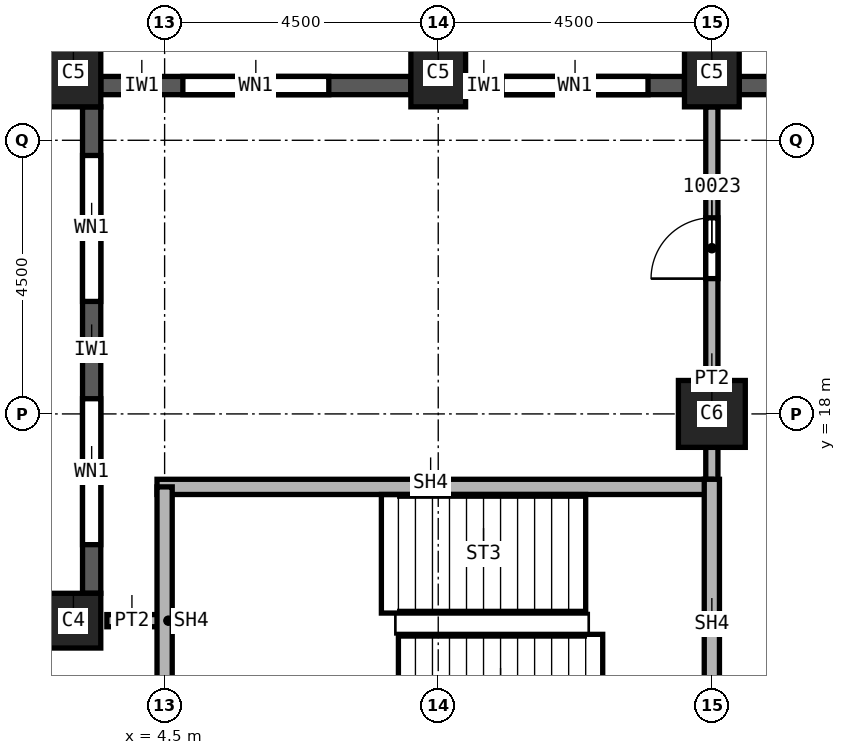
"""IFC4 building model, lengths in metres.
Left out: names, types, materials, properties, quantities, classifications, styles, units other than length and angle.
Written with IfcOpenShell. Run it as: python <this file> out.ifc"""

import sys

from ifc_helpers import new_model, si_unit, direction, frame, frame_2d, origin, origin_2d, place, context, subcontext, project, spatial, rectangle, extrude, element, fill, save


model = new_model("IFC4")
c1 = context("Model", 3, precision=1e-05, world=origin(), true_north=direction((0.0, 1.0)))
c2 = subcontext(c1, "Body", "Model", "MODEL_VIEW")
j1 = project(units=[si_unit("LENGTHUNIT", "METRE"), si_unit("PLANEANGLEUNIT", "RADIAN")], contexts=[c1])
p1 = place(None, origin())
s1 = spatial("IfcSite", under=j1, at=p1, CompositionType="ELEMENT")
p2 = place(p1, origin())
s2 = spatial("IfcBuilding", under=s1, at=p2, CompositionType="ELEMENT")
p3 = place(p2, frame((0.0, 0.0, 170.0)))
s3 = spatial("IfcBuildingStorey", under=s2, at=p3, CompositionType="ELEMENT", Elevation=170.0)
p4 = place(p3, frame((13.5, 18.0, 0.0), z_axis=(0.0, 0.0, 1.0), x_axis=(1.0, 0.0, 0.0)))
e1 = element("IfcColumn", 1, at=p4, inside=s3, PredefinedType="COLUMN", context=c2, shape_type="SweptSolid", body=[
    extrude(rectangle(XDim=1.1, YDim=1.1, at=origin_2d()), origin(), (0.0, 0.0, 1.0), 3.7),
])
for number, where, z_axis, x_axis in (
    (2, (3.0, 23.6, 0.0), (0.0, 0.0, 1.0), (1.0, 0.0, 0.0)),
    (3, (9.0, 23.6, 0.0), (0.0, 0.0, 1.0), (1.0, 0.0, 0.0)),
    (4, (13.5, 23.6, 0.0), (0.0, 0.0, 1.0), (1.0, 0.0, 0.0)),
):
    element("IfcColumn", number, at=place(p3, frame(where, z_axis=z_axis, x_axis=x_axis)), inside=s3, PredefinedType="COLUMN", context=c2, shape_type="SweptSolid", body=[
        extrude(rectangle(XDim=0.9, YDim=1.1, at=origin_2d()), origin(), (0.0, 0.0, 1.0), 3.7),
    ])
p5 = place(p3, frame((3.0, 14.6, 0.0), z_axis=(0.0, 0.0, 1.0), x_axis=(1.0, 0.0, 0.0)))
e5 = element("IfcColumn", 5, at=p5, inside=s3, PredefinedType="COLUMN", context=c2, shape_type="SweptSolid", body=[
    extrude(rectangle(XDim=0.9, YDim=0.9, at=origin_2d()), origin(), (0.0, 0.0, 1.0), 3.7),
])
p6 = place(p3, frame((17.55, 23.4, 0.0), z_axis=(0.0, 0.0, 1.0), x_axis=(-1.0, 0.0, 0.0)))
e6 = element("IfcWall", 6, at=p6, inside=s3, PredefinedType="SOLIDWALL", context=c2, shape_type="SweptSolid", body=[
    extrude(rectangle(XDim=3.6, YDim=0.3, at=frame_2d((1.8, 0.0))), origin(), (0.0, 0.0, 1.0), 3.1),
])
p7 = place(p6, frame((0.775, 0.0, 0.8)))
e7 = element("IfcOpeningElement", 7, at=p7, cuts=e6, PredefinedType="OPENING", context=c2, shape_type="SweptSolid", body=[
    extrude(rectangle(XDim=1.0, YDim=1.95, at=frame_2d((0.5, 0.975))), frame((0.0, 0.15, 0.0), z_axis=(0.0, -1.0, 0.0), x_axis=(1.0, 0.0, 0.0)), (0.0, 0.0, 1.0), 0.3),
])
p8 = place(p6, frame((2.375, 0.0, 0.8)))
e8 = element("IfcOpeningElement", 8, at=p8, cuts=e6, PredefinedType="OPENING", context=c2, shape_type="SweptSolid", body=[
    extrude(rectangle(XDim=0.6, YDim=1.95, at=frame_2d((0.3, 0.975))), frame((0.0, 0.15, 0.0), z_axis=(0.0, -1.0, 0.0), x_axis=(1.0, 0.0, 0.0)), (0.0, 0.0, 1.0), 0.3),
])
p9 = place(p3, frame((13.05, 23.4, 0.0), z_axis=(0.0, 0.0, 1.0), x_axis=(-1.0, 0.0, 0.0)))
e9 = element("IfcWall", 9, at=p9, inside=s3, PredefinedType="SOLIDWALL", context=c2, shape_type="SweptSolid", body=[
    extrude(rectangle(XDim=3.6, YDim=0.3, at=frame_2d((1.8, 0.0))), origin(), (0.0, 0.0, 1.0), 3.1),
])
p10 = place(p9, frame((0.6, 0.0, 0.8)))
e10 = element("IfcOpeningElement", 10, at=p10, cuts=e9, PredefinedType="OPENING", context=c2, shape_type="SweptSolid", body=[
    extrude(rectangle(XDim=2.4, YDim=1.95, at=frame_2d((1.2, 0.975))), frame((0.0, 0.15, 0.0), z_axis=(0.0, -1.0, 0.0), x_axis=(1.0, 0.0, 0.0)), (0.0, 0.0, 1.0), 0.3),
])
p11 = place(p3, frame((8.55, 23.4, 0.0), z_axis=(0.0, 0.0, 1.0), x_axis=(-1.0, 0.0, 0.0)))
e11 = element("IfcWall", 11, at=p11, inside=s3, PredefinedType="SOLIDWALL", context=c2, shape_type="SweptSolid", body=[
    extrude(rectangle(XDim=5.1, YDim=0.3, at=frame_2d((2.55, 0.0))), origin(), (0.0, 0.0, 1.0), 3.1),
])
p12 = place(p11, frame((1.35, 0.0, 0.8)))
e12 = element("IfcOpeningElement", 12, at=p12, cuts=e11, PredefinedType="OPENING", context=c2, shape_type="SweptSolid", body=[
    extrude(rectangle(XDim=2.4, YDim=1.95, at=frame_2d((1.2, 0.975))), frame((0.0, 0.15, 0.0), z_axis=(0.0, -1.0, 0.0), x_axis=(1.0, 0.0, 0.0)), (0.0, 0.0, 1.0), 0.3),
])
p13 = place(p3, frame((3.3, 23.05, 0.0), z_axis=(0.0, 0.0, 1.0), x_axis=(0.0, -1.0, 0.0)))
e13 = element("IfcWall", 13, at=p13, inside=s3, PredefinedType="SOLIDWALL", context=c2, shape_type="SweptSolid", body=[
    extrude(rectangle(XDim=8.0, YDim=0.3, at=frame_2d((4.0, 0.0))), origin(), (0.0, 0.0, 1.0), 3.1),
])
p14 = place(p13, frame((0.8, 0.0, 0.8)))
e14 = element("IfcOpeningElement", 14, at=p14, cuts=e13, PredefinedType="OPENING", context=c2, shape_type="SweptSolid", body=[
    extrude(rectangle(XDim=2.4, YDim=1.95, at=frame_2d((1.2, 0.975))), frame((0.0, 0.15, 0.0), z_axis=(0.0, -1.0, 0.0), x_axis=(1.0, 0.0, 0.0)), (0.0, 0.0, 1.0), 0.3),
])
p15 = place(p13, frame((4.8, 0.0, 0.8)))
e15 = element("IfcOpeningElement", 15, at=p15, cuts=e13, PredefinedType="OPENING", context=c2, shape_type="SweptSolid", body=[
    extrude(rectangle(XDim=2.4, YDim=1.95, at=frame_2d((1.2, 0.975))), frame((0.0, 0.15, 0.0), z_axis=(0.0, -1.0, 0.0), x_axis=(1.0, 0.0, 0.0)), (0.0, 0.0, 1.0), 0.3),
])
p16 = place(p3, frame((3.55, 14.6, 0.0), z_axis=(0.0, 0.0, 1.0), x_axis=(1.0, 0.0, 0.0)))
e16 = element("IfcWall", 16, at=p16, inside=s3, PredefinedType="PARTITIONING", context=c2, shape_type="SweptSolid", body=[
    extrude(rectangle(XDim=0.95, YDim=0.2, at=frame_2d((0.475, 0.0))), origin(), (0.0, 0.0, 1.0), 3.7),
])
p17 = place(p3, frame((13.5, 16.675, 0.0), z_axis=(0.0, 0.0, 1.0), x_axis=(0.0, 1.0, 0.0)))
e17 = element("IfcWall", 17, at=p17, inside=s3, PredefinedType="PARTITIONING", context=c2, shape_type="SweptSolid", body=[
    extrude(rectangle(XDim=6.375, YDim=0.2, at=frame_2d((3.188, 0.0))), origin(), (0.0, 0.0, 1.0), 3.7),
])
p18 = place(p17, frame((3.55, 0.0, 0.0)))
e18 = element("IfcOpeningElement", 18, at=p18, cuts=e17, PredefinedType="OPENING", context=c2, shape_type="SweptSolid", body=[
    extrude(rectangle(XDim=1.0, YDim=2.1, at=frame_2d((0.5, 1.05))), frame((0.0, 0.1, 0.0), z_axis=(0.0, -1.0, 0.0), x_axis=(1.0, 0.0, 0.0)), (0.0, 0.0, 1.0), 0.2),
])
p19 = place(p3, frame((4.375, 16.8, 0.0), z_axis=(0.0, 0.0, 1.0), x_axis=(1.0, 0.0, 0.0)))
e19 = element("IfcWall", 19, at=p19, inside=s3, PredefinedType="SOLIDWALL", context=c2, shape_type="SweptSolid", body=[
    extrude(rectangle(XDim=9.125, YDim=0.25, at=frame_2d((4.562, 0.0))), origin(), (0.0, 0.0, 1.0), 3.7),
])
p20 = place(p3, frame((4.5, 12.3, 0.0), z_axis=(0.0, 0.0, 1.0), x_axis=(0.0, 1.0, 0.0)))
e20 = element("IfcWall", 20, at=p20, inside=s3, PredefinedType="SOLIDWALL", context=c2, shape_type="SweptSolid", body=[
    extrude(rectangle(XDim=4.5, YDim=0.25, at=frame_2d((2.25, 0.0))), origin(), (0.0, 0.0, 1.0), 3.7),
])
p21 = place(p3, frame((13.5, 12.175, 0.0), z_axis=(0.0, 0.0, 1.0), x_axis=(0.0, 1.0, 0.0)))
e21 = element("IfcWall", 21, at=p21, inside=s3, PredefinedType="SOLIDWALL", context=c2, shape_type="SweptSolid", body=[
    extrude(rectangle(XDim=4.75, YDim=0.25, at=frame_2d((2.375, 0.0))), origin(), (0.0, 0.0, 1.0), 3.7),
])
p22 = place(p10, origin())
e22 = element("IfcWindow", 22, at=p22, inside=s3, PartitioningType="SINGLE_PANEL", PredefinedType="WINDOW", context=c2, shape_type="SweptSolid", body=[
    extrude(rectangle(XDim=2.4, YDim=1.95, at=frame_2d((1.2, 0.975))), frame((0.0, 0.03, 0.0), z_axis=(0.0, -1.0, 0.0), x_axis=(1.0, 0.0, 0.0)), (0.0, 0.0, 1.0), 0.06),
])
fill(e10, e22)
p23 = place(p12, origin())
e23 = element("IfcWindow", 23, at=p23, inside=s3, PartitioningType="SINGLE_PANEL", PredefinedType="WINDOW", context=c2, shape_type="SweptSolid", body=[
    extrude(rectangle(XDim=2.4, YDim=1.95, at=frame_2d((1.2, 0.975))), frame((0.0, 0.03, 0.0), z_axis=(0.0, -1.0, 0.0), x_axis=(1.0, 0.0, 0.0)), (0.0, 0.0, 1.0), 0.06),
])
fill(e12, e23)
p24 = place(p14, origin())
e24 = element("IfcWindow", 24, at=p24, inside=s3, PartitioningType="SINGLE_PANEL", PredefinedType="WINDOW", context=c2, shape_type="SweptSolid", body=[
    extrude(rectangle(XDim=2.4, YDim=1.95, at=frame_2d((1.2, 0.975))), frame((0.0, 0.03, 0.0), z_axis=(0.0, -1.0, 0.0), x_axis=(1.0, 0.0, 0.0)), (0.0, 0.0, 1.0), 0.06),
])
fill(e14, e24)
p25 = place(p15, origin())
e25 = element("IfcWindow", 25, at=p25, inside=s3, PartitioningType="SINGLE_PANEL", PredefinedType="WINDOW", context=c2, shape_type="SweptSolid", body=[
    extrude(rectangle(XDim=2.4, YDim=1.95, at=frame_2d((1.2, 0.975))), frame((0.0, 0.03, 0.0), z_axis=(0.0, -1.0, 0.0), x_axis=(1.0, 0.0, 0.0)), (0.0, 0.0, 1.0), 0.06),
])
fill(e15, e25)
p26 = place(p18, origin())
e26 = element("IfcDoor", 26, at=p26, inside=s3, OperationType="SINGLE_SWING_RIGHT", PredefinedType="DOOR", context=c2, shape_type="SweptSolid", body=[
    extrude(rectangle(XDim=1.0, YDim=2.1, at=frame_2d((0.5, 1.05))), frame((0.0, 0.025, 0.0), z_axis=(0.0, -1.0, 0.0), x_axis=(1.0, 0.0, 0.0)), (0.0, 0.0, 1.0), 0.05),
])
fill(e18, e26)
save(model, sys.argv[1])
